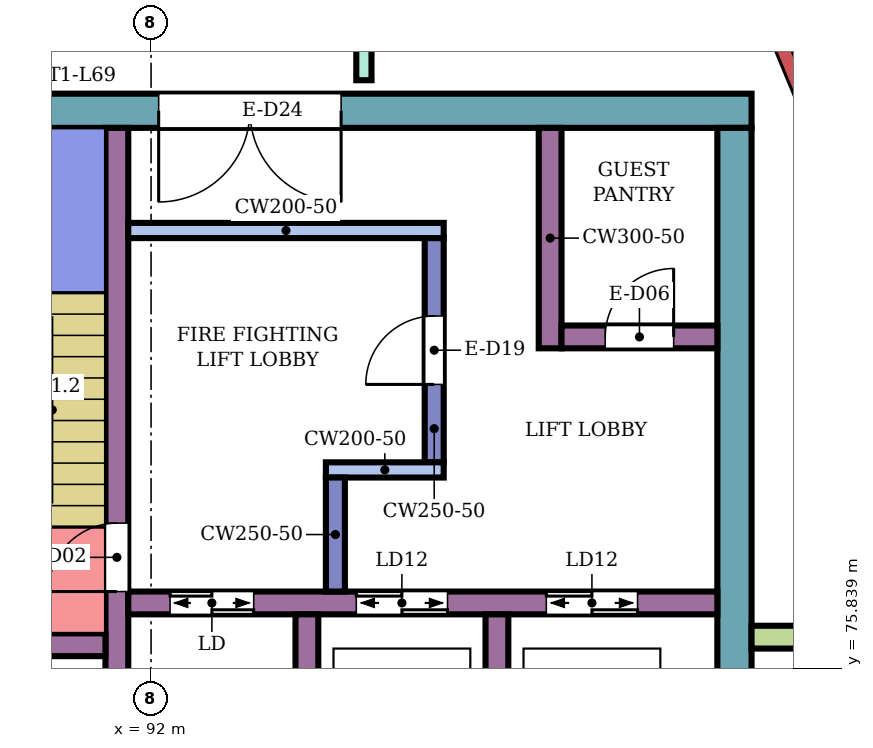
"""IFC4 building model, lengths in metres.
Left out: names, types, materials, properties, quantities, classifications, styles, units other than length and angle.
Written with IfcOpenShell. Run it as: python <this file> out.ifc"""

import sys

from ifc_helpers import new_model, si_unit, direction, frame, frame_2d, origin, place, context, subcontext, project, spatial, rectangle, extrude, element, fill, save


model = new_model("IFC4")
c1 = context("Model", 3, precision=1e-05, world=origin(), true_north=direction((0.0, 1.0)))
c2 = subcontext(c1, "Body", "Model", "MODEL_VIEW")
j1 = project(units=[si_unit("LENGTHUNIT", "METRE"), si_unit("PLANEANGLEUNIT", "RADIAN")], contexts=[c1])
p1 = place(None, origin())
s1 = spatial("IfcSite", under=j1, at=p1, CompositionType="ELEMENT")
p2 = place(p1, origin())
s2 = spatial("IfcBuilding", under=s1, at=p2, CompositionType="ELEMENT")
p3 = place(p2, frame((0.0, 0.0, 300.9)))
s3 = spatial("IfcBuildingStorey", under=s2, at=p3, CompositionType="ELEMENT", Elevation=300.9)
p4 = place(p3, frame((87.9, 83.175, 0.0), z_axis=(0.0, 0.0, 1.0), x_axis=(1.0, 0.0, 0.0)))
e1 = element("IfcWall", 1, at=p4, inside=s3, PredefinedType="SHEAR", context=c2, shape_type="SweptSolid", body=[
    extrude(rectangle(XDim=12.0, YDim=0.45, at=frame_2d((6.0, 0.0))), origin(), (0.0, 0.0, 1.0), 3.88),
])
p5 = place(p4, frame((4.2, 0.0, 0.0)))
e2 = element("IfcOpeningElement", 2, at=p5, cuts=e1, PredefinedType="OPENING", context=c2, shape_type="SweptSolid", body=[
    extrude(rectangle(XDim=2.4, YDim=2.4, at=frame_2d((1.2, 1.2))), frame((0.0, 0.235, 0.0), z_axis=(0.0, -1.0, 0.0), x_axis=(1.0, 0.0, 0.0)), (0.0, 0.0, 1.0), 0.47),
])
p6 = place(p3, frame((99.675, 73.6, 0.0), z_axis=(0.0, 0.0, 1.0), x_axis=(0.0, 1.0, 0.0)))
e3 = element("IfcWall", 3, at=p6, inside=s3, PredefinedType="SHEAR", context=c2, shape_type="SweptSolid", body=[
    extrude(rectangle(XDim=9.35, YDim=0.45, at=frame_2d((4.675, 0.0))), origin(), (0.0, 0.0, 1.0), 3.88),
])
p7 = place(p3, frame((91.55, 75.0, 0.0), z_axis=(0.0, 0.0, 1.0), x_axis=(0.0, 1.0, 0.0)))
e4 = element("IfcWall", 4, at=p7, inside=s3, PredefinedType="SHEAR", context=c2, shape_type="SweptSolid", body=[
    extrude(rectangle(XDim=7.95, YDim=0.3, at=frame_2d((3.975, 0.0))), origin(), (0.0, 0.0, 1.0), 3.88),
])
p8 = place(p7, frame((1.85, 0.0, 0.0)))
e5 = element("IfcOpeningElement", 5, at=p8, cuts=e4, PredefinedType="OPENING", context=c2, shape_type="SweptSolid", body=[
    extrude(rectangle(XDim=0.9, YDim=2.1, at=frame_2d((0.45, 1.05))), frame((0.0, 0.16, 0.0), z_axis=(0.0, -1.0, 0.0), x_axis=(1.0, 0.0, 0.0)), (0.0, 0.0, 1.0), 0.32),
])
p9 = place(p3, frame((88.35, 76.15, 0.0), z_axis=(0.0, 0.0, 1.0), x_axis=(1.0, 0.0, 0.0)))
e6 = element("IfcWall", 6, at=p9, inside=s3, PredefinedType="SHEAR", context=c2, shape_type="SweptSolid", body=[
    extrude(rectangle(XDim=3.05, YDim=0.3, at=frame_2d((1.525, 0.0))), origin(), (0.0, 0.0, 1.0), 3.88),
])
p10 = place(p9, frame((1.1, 0.0, 0.0)))
e7 = element("IfcOpeningElement", 7, at=p10, cuts=e6, PredefinedType="OPENING", context=c2, shape_type="SweptSolid", body=[
    extrude(rectangle(XDim=0.7, YDim=2.0, at=frame_2d((0.35, 1.0))), frame((0.0, 0.16, 0.0), z_axis=(0.0, -1.0, 0.0), x_axis=(1.0, 0.0, 0.0)), (0.0, 0.0, 1.0), 0.32),
])
p11 = place(p3, frame((91.7, 76.7, 0.0), z_axis=(0.0, 0.0, 1.0), x_axis=(1.0, 0.0, 0.0)))
e8 = element("IfcWall", 8, at=p11, inside=s3, PredefinedType="SHEAR", context=c2, shape_type="SweptSolid", body=[
    extrude(rectangle(XDim=7.75, YDim=0.3, at=frame_2d((3.875, 0.0))), origin(), (0.0, 0.0, 1.0), 3.88),
])
p12 = place(p11, frame((0.55, 0.0, 0.0)))
e9 = element("IfcOpeningElement", 9, at=p12, cuts=e8, PredefinedType="OPENING", context=c2, shape_type="SweptSolid", body=[
    extrude(rectangle(XDim=1.1, YDim=2.1, at=frame_2d((0.55, 1.05))), frame((0.0, 0.16, 0.0), z_axis=(0.0, -1.0, 0.0), x_axis=(1.0, 0.0, 0.0)), (0.0, 0.0, 1.0), 0.32),
])
p13 = place(p11, frame((3.0, 0.0, 0.0)))
e10 = element("IfcOpeningElement", 10, at=p13, cuts=e8, PredefinedType="OPENING", context=c2, shape_type="SweptSolid", body=[
    extrude(rectangle(XDim=1.2, YDim=2.1, at=frame_2d((0.6, 1.05))), frame((0.0, 0.16, 0.0), z_axis=(0.0, -1.0, 0.0), x_axis=(1.0, 0.0, 0.0)), (0.0, 0.0, 1.0), 0.32),
])
p14 = place(p11, frame((5.5, 0.0, 0.0)))
e11 = element("IfcOpeningElement", 11, at=p14, cuts=e8, PredefinedType="OPENING", context=c2, shape_type="SweptSolid", body=[
    extrude(rectangle(XDim=1.2, YDim=2.1, at=frame_2d((0.6, 1.05))), frame((0.0, 0.16, 0.0), z_axis=(0.0, -1.0, 0.0), x_axis=(1.0, 0.0, 0.0)), (0.0, 0.0, 1.0), 0.32),
])
for number, where, z_axis, x_axis in (
    (12, (94.05, 74.0, 0.0), (0.0, 0.0, 1.0), (0.0, 1.0, 0.0)),
    (13, (96.55, 74.0, 0.0), (0.0, 0.0, 1.0), (0.0, 1.0, 0.0)),
):
    element("IfcWall", number, at=place(p3, frame(where, z_axis=z_axis, x_axis=x_axis)), inside=s3, PredefinedType="SHEAR", context=c2, shape_type="SweptSolid", body=[
        extrude(rectangle(XDim=2.55, YDim=0.3, at=frame_2d((1.275, 0.0))), origin(), (0.0, 0.0, 1.0), 3.88),
    ])
p15 = place(p3, frame((91.7, 81.6, 0.0), z_axis=(0.0, 0.0, 1.0), x_axis=(1.0, 0.0, 0.0)))
e14 = element("IfcWall", 14, at=p15, inside=s3, PredefinedType="SHEAR", context=c2, shape_type="SweptSolid", body=[
    extrude(rectangle(XDim=4.15, YDim=0.2, at=frame_2d((2.075, 0.0))), origin(), (0.0, 0.0, 1.0), 3.88),
])
p16 = place(p3, frame((95.725, 78.55, 0.0), z_axis=(0.0, 0.0, 1.0), x_axis=(0.0, 1.0, 0.0)))
e15 = element("IfcWall", 15, at=p16, inside=s3, PredefinedType="SHEAR", context=c2, shape_type="SweptSolid", body=[
    extrude(rectangle(XDim=2.95, YDim=0.25, at=frame_2d((1.475, 0.0))), origin(), (0.0, 0.0, 1.0), 3.88),
])
p17 = place(p16, frame((1.025, 0.0, 0.0)))
e16 = element("IfcOpeningElement", 16, at=p17, cuts=e15, PredefinedType="OPENING", context=c2, shape_type="SweptSolid", body=[
    extrude(rectangle(XDim=0.9, YDim=2.1, at=frame_2d((0.45, 1.05))), frame((0.0, 0.135, 0.0), z_axis=(0.0, -1.0, 0.0), x_axis=(1.0, 0.0, 0.0)), (0.0, 0.0, 1.0), 0.27),
])
p18 = place(p3, frame((94.3, 78.45, 0.0), z_axis=(0.0, 0.0, 1.0), x_axis=(1.0, 0.0, 0.0)))
e17 = element("IfcWall", 17, at=p18, inside=s3, PredefinedType="SHEAR", context=c2, shape_type="SweptSolid", body=[
    extrude(rectangle(XDim=1.55, YDim=0.2, at=frame_2d((0.775, 0.0))), origin(), (0.0, 0.0, 1.0), 3.88),
])
p19 = place(p3, frame((94.425, 76.85, 0.0), z_axis=(0.0, 0.0, 1.0), x_axis=(0.0, 1.0, 0.0)))
e18 = element("IfcWall", 18, at=p19, inside=s3, PredefinedType="SHEAR", context=c2, shape_type="SweptSolid", body=[
    extrude(rectangle(XDim=1.5, YDim=0.25, at=frame_2d((0.75, 0.0))), origin(), (0.0, 0.0, 1.0), 3.88),
])
p20 = place(p3, frame((97.25, 80.05, 0.0), z_axis=(0.0, 0.0, 1.0), x_axis=(0.0, 1.0, 0.0)))
e19 = element("IfcWall", 19, at=p20, inside=s3, PredefinedType="SHEAR", context=c2, shape_type="SweptSolid", body=[
    extrude(rectangle(XDim=2.9, YDim=0.3, at=frame_2d((1.45, 0.0))), origin(), (0.0, 0.0, 1.0), 3.88),
])
p21 = place(p3, frame((97.4, 80.2, 0.0), z_axis=(0.0, 0.0, 1.0), x_axis=(1.0, 0.0, 0.0)))
e20 = element("IfcWall", 20, at=p21, inside=s3, PredefinedType="SHEAR", context=c2, shape_type="SweptSolid", body=[
    extrude(rectangle(XDim=2.05, YDim=0.3, at=frame_2d((1.025, 0.0))), origin(), (0.0, 0.0, 1.0), 3.88),
])
p22 = place(p21, frame((0.575, 0.0, 0.0)))
e21 = element("IfcOpeningElement", 21, at=p22, cuts=e20, PredefinedType="OPENING", context=c2, shape_type="SweptSolid", body=[
    extrude(rectangle(XDim=0.9, YDim=2.1, at=frame_2d((0.45, 1.05))), frame((0.0, 0.16, 0.0), z_axis=(0.0, -1.0, 0.0), x_axis=(1.0, 0.0, 0.0)), (0.0, 0.0, 1.0), 0.32),
])
p23 = place(p3, frame((99.9, 76.25, 0.0), z_axis=(0.0, 0.0, 1.0), x_axis=(1.0, 0.0, 0.0)))
e22 = element("IfcWall", 22, at=p23, inside=s3, PredefinedType="NOTDEFINED", context=c2, shape_type="SweptSolid", body=[
    extrude(rectangle(XDim=2.416, YDim=0.3, at=frame_2d((1.208, 0.0))), origin(), (0.0, 0.0, 1.0), 4.2),
])
p24 = place(p3, frame((94.8, 83.577, 0.0), z_axis=(0.0, 0.0, 1.0), x_axis=(0.0, 1.0, 0.0)))
e23 = element("IfcWall", 23, at=p24, inside=s3, PredefinedType="PARTITIONING", context=c2, shape_type="SweptSolid", body=[
    extrude(rectangle(XDim=1.323, YDim=0.2, at=frame_2d((0.662, 0.0))), origin(), (0.0, 0.0, 1.0), 3.75),
])
p25 = place(p8, origin())
e24 = element("IfcDoor", 24, at=p25, inside=s3, OperationType="SINGLE_SWING_LEFT", PredefinedType="DOOR", context=c2, shape_type="SweptSolid", body=[
    extrude(rectangle(XDim=0.9, YDim=2.1, at=frame_2d((0.45, 1.05))), frame((0.0, 0.025, 0.0), z_axis=(0.0, -1.0, 0.0), x_axis=(1.0, 0.0, 0.0)), (0.0, 0.0, 1.0), 0.05),
])
fill(e5, e24)
p26 = place(p12, origin())
e25 = element("IfcDoor", 25, at=p26, inside=s3, OperationType="DOUBLE_DOOR_SLIDING", PredefinedType="DOOR", context=c2, shape_type="SweptSolid", body=[
    extrude(rectangle(XDim=1.1, YDim=2.1, at=frame_2d((0.55, 1.05))), frame((0.0, 0.025, 0.0), z_axis=(0.0, -1.0, 0.0), x_axis=(1.0, 0.0, 0.0)), (0.0, 0.0, 1.0), 0.05),
])
fill(e9, e25)
p27 = place(p13, origin())
e26 = element("IfcDoor", 26, at=p27, inside=s3, OperationType="DOUBLE_DOOR_SLIDING", PredefinedType="DOOR", context=c2, shape_type="SweptSolid", body=[
    extrude(rectangle(XDim=1.2, YDim=2.1, at=frame_2d((0.6, 1.05))), frame((0.0, 0.025, 0.0), z_axis=(0.0, -1.0, 0.0), x_axis=(1.0, 0.0, 0.0)), (0.0, 0.0, 1.0), 0.05),
])
fill(e10, e26)
p28 = place(p14, origin())
e27 = element("IfcDoor", 27, at=p28, inside=s3, OperationType="DOUBLE_DOOR_SLIDING", PredefinedType="DOOR", context=c2, shape_type="SweptSolid", body=[
    extrude(rectangle(XDim=1.2, YDim=2.1, at=frame_2d((0.6, 1.05))), frame((0.0, 0.025, 0.0), z_axis=(0.0, -1.0, 0.0), x_axis=(1.0, 0.0, 0.0)), (0.0, 0.0, 1.0), 0.05),
])
fill(e11, e27)
p29 = place(p17, origin())
e28 = element("IfcDoor", 28, at=p29, inside=s3, OperationType="SINGLE_SWING_LEFT", PredefinedType="DOOR", context=c2, shape_type="SweptSolid", body=[
    extrude(rectangle(XDim=0.9, YDim=2.1, at=frame_2d((0.45, 1.05))), frame((0.0, 0.025, 0.0), z_axis=(0.0, -1.0, 0.0), x_axis=(1.0, 0.0, 0.0)), (0.0, 0.0, 1.0), 0.05),
])
fill(e16, e28)
p30 = place(p22, origin())
e29 = element("IfcDoor", 29, at=p30, inside=s3, OperationType="SINGLE_SWING_RIGHT", PredefinedType="DOOR", context=c2, shape_type="SweptSolid", body=[
    extrude(rectangle(XDim=0.9, YDim=2.1, at=frame_2d((0.45, 1.05))), frame((0.0, 0.025, 0.0), z_axis=(0.0, -1.0, 0.0), x_axis=(1.0, 0.0, 0.0)), (0.0, 0.0, 1.0), 0.05),
])
fill(e21, e29)
p31 = place(p5, frame((2.4, 0.0, 0.0), z_axis=(0.0, 0.0, 1.0), x_axis=(-1.0, 0.0, 0.0)))
e30 = element("IfcDoor", 30, at=p31, inside=s3, OperationType="DOUBLE_DOOR_SINGLE_SWING", PredefinedType="DOOR", context=c2, shape_type="SweptSolid", body=[
    extrude(rectangle(XDim=2.4, YDim=2.4, at=frame_2d((1.2, 1.2))), frame((0.0, 0.025, 0.0), z_axis=(0.0, -1.0, 0.0), x_axis=(1.0, 0.0, 0.0)), (0.0, 0.0, 1.0), 0.05),
])
fill(e2, e30)
save(model, sys.argv[1])
